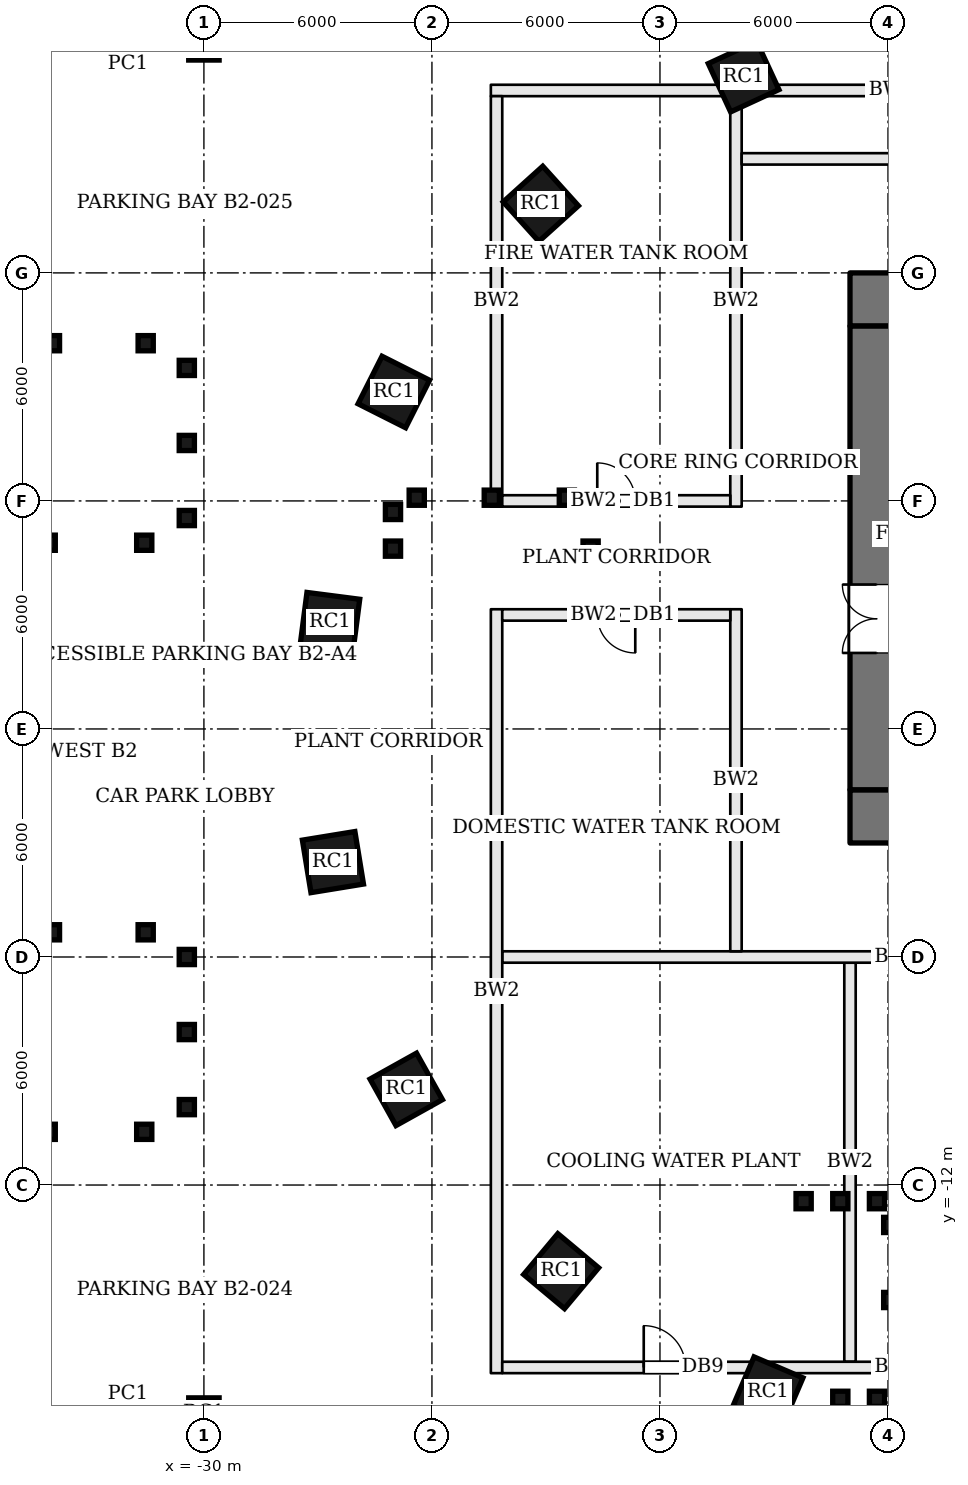
"""IFC4 building model, lengths in metres.
Left out: names, types, materials, properties, quantities, classifications, styles, units other than length and angle.
Written with IfcOpenShell. Run it as: python <this file> out.ifc"""

import sys

from ifc_helpers import new_model, si_unit, direction, frame, frame_2d, origin, origin_2d, place, context, subcontext, project, spatial, rectangle, extrude, element, fill, save


model = new_model("IFC4")
c1 = context("Model", 3, precision=1e-05, world=origin(), true_north=direction((0.0, 1.0)))
c2 = subcontext(c1, "Body", "Model", "MODEL_VIEW")
j1 = project(units=[si_unit("LENGTHUNIT", "METRE"), si_unit("PLANEANGLEUNIT", "RADIAN")], contexts=[c1])
p1 = place(None, origin())
s1 = spatial("IfcSite", under=j1, at=p1, CompositionType="ELEMENT")
p2 = place(p1, origin())
s2 = spatial("IfcBuilding", under=s1, at=p2, CompositionType="ELEMENT")
p3 = place(p2, frame((0.0, 0.0, -10.5)))
s3 = spatial("IfcBuildingStorey", under=s2, at=p3, CompositionType="ELEMENT", Elevation=-10.5)
for number, where, z_axis, x_axis in (
    (1, (-30.0, -18.0, 0.0), (0.0, 0.0, 1.0), (1.0, 0.0, 0.0)),
    (2, (-30.0, 18.0, 0.0), (0.0, 0.0, 1.0), (1.0, 0.0, 0.0)),
):
    element("IfcColumn", number, at=place(p3, frame(where, z_axis=z_axis, x_axis=x_axis)), inside=s3, PredefinedType="COLUMN", context=c2, shape_type="SweptSolid", body=[
        extrude(rectangle(XDim=0.8, YDim=0.8, at=origin_2d()), origin(), (0.0, 0.0, 1.0), 4.5),
    ])
p4 = place(p3, frame((-13.0, 11.3, 0.0), z_axis=(0.0, 0.0, 1.0), x_axis=(1.0, 0.0, 0.0)))
e3 = element("IfcWall", 3, at=p4, inside=s3, PredefinedType="SHEAR", context=c2, shape_type="SweptSolid", body=[
    extrude(rectangle(XDim=26.0, YDim=1.4, at=frame_2d((13.0, 0.0))), origin(), (0.0, 0.0, 1.0), 4.5),
])
p5 = place(p4, frame((9.55, 0.0, 0.0)))
e4 = element("IfcOpeningElement", 4, at=p5, cuts=e3, PredefinedType="OPENING", context=c2, shape_type="SweptSolid", body=[
    extrude(rectangle(XDim=1.2, YDim=2.1, at=frame_2d((0.6, 1.05))), frame((0.0, 0.71, 0.0), z_axis=(0.0, -1.0, 0.0), x_axis=(1.0, 0.0, 0.0)), (0.0, 0.0, 1.0), 1.42),
])
p6 = place(p4, frame((13.075, 0.0, 0.0)))
e5 = element("IfcOpeningElement", 5, at=p6, cuts=e3, PredefinedType="OPENING", context=c2, shape_type="SweptSolid", body=[
    extrude(rectangle(XDim=0.7, YDim=2.1, at=frame_2d((0.35, 1.05))), frame((0.0, 0.71, 0.0), z_axis=(0.0, -1.0, 0.0), x_axis=(1.0, 0.0, 0.0)), (0.0, 0.0, 1.0), 1.42),
])
p7 = place(p4, frame((15.925, 0.0, 0.0)))
e6 = element("IfcOpeningElement", 6, at=p7, cuts=e3, PredefinedType="OPENING", context=c2, shape_type="SweptSolid", body=[
    extrude(rectangle(XDim=0.7, YDim=2.1, at=frame_2d((0.35, 1.05))), frame((0.0, 0.71, 0.0), z_axis=(0.0, -1.0, 0.0), x_axis=(1.0, 0.0, 0.0)), (0.0, 0.0, 1.0), 1.42),
])
p8 = place(p3, frame((-13.0, -2.3, 0.0), z_axis=(0.0, 0.0, 1.0), x_axis=(1.0, 0.0, 0.0)))
e7 = element("IfcWall", 7, at=p8, inside=s3, PredefinedType="SHEAR", context=c2, shape_type="SweptSolid", body=[
    extrude(rectangle(XDim=26.0, YDim=1.4, at=frame_2d((13.0, 0.0))), origin(), (0.0, 0.0, 1.0), 4.5),
])
p9 = place(p8, frame((8.725, 0.0, 0.0)))
e8 = element("IfcOpeningElement", 8, at=p9, cuts=e7, PredefinedType="OPENING", context=c2, shape_type="SweptSolid", body=[
    extrude(rectangle(XDim=1.2, YDim=2.1, at=frame_2d((0.6, 1.05))), frame((0.0, 0.71, 0.0), z_axis=(0.0, -1.0, 0.0), x_axis=(1.0, 0.0, 0.0)), (0.0, 0.0, 1.0), 1.42),
])
p10 = place(p8, frame((12.0, 0.0, 0.0)))
e9 = element("IfcOpeningElement", 9, at=p10, cuts=e7, PredefinedType="OPENING", context=c2, shape_type="SweptSolid", body=[
    extrude(rectangle(XDim=1.2, YDim=2.1, at=frame_2d((0.6, 1.05))), frame((0.0, 0.71, 0.0), z_axis=(0.0, -1.0, 0.0), x_axis=(1.0, 0.0, 0.0)), (0.0, 0.0, 1.0), 1.42),
])
p11 = place(p8, frame((15.675, 0.0, 0.0)))
e10 = element("IfcOpeningElement", 10, at=p11, cuts=e7, PredefinedType="OPENING", context=c2, shape_type="SweptSolid", body=[
    extrude(rectangle(XDim=1.2, YDim=2.1, at=frame_2d((0.6, 1.05))), frame((0.0, 0.71, 0.0), z_axis=(0.0, -1.0, 0.0), x_axis=(1.0, 0.0, 0.0)), (0.0, 0.0, 1.0), 1.42),
])
p12 = place(p3, frame((-12.3, -1.6, 0.0), z_axis=(0.0, 0.0, 1.0), x_axis=(0.0, 1.0, 0.0)))
e11 = element("IfcWall", 11, at=p12, inside=s3, PredefinedType="SHEAR", context=c2, shape_type="SweptSolid", body=[
    extrude(rectangle(XDim=12.2, YDim=1.4, at=frame_2d((6.1, 0.0))), origin(), (0.0, 0.0, 1.0), 4.5),
])
p13 = place(p12, frame((3.6, 0.0, 0.0)))
e12 = element("IfcOpeningElement", 12, at=p13, cuts=e11, PredefinedType="OPENING", context=c2, shape_type="SweptSolid", body=[
    extrude(rectangle(XDim=1.8, YDim=2.1, at=frame_2d((0.9, 1.05))), frame((0.0, 0.71, 0.0), z_axis=(0.0, -1.0, 0.0), x_axis=(1.0, 0.0, 0.0)), (0.0, 0.0, 1.0), 1.42),
])
for number, where, z_axis, x_axis in (
    (13, (-15.799, 17.165, 0.0), (0.0, 0.0, 1.0), (-0.908, -0.419, 0.0)),
    (14, (-21.135, 13.817, 0.0), (0.0, 0.0, 1.0), (-0.743, -0.67, 0.0)),
    (15, (-25.003, 8.866, 0.0), (0.0, 0.0, 1.0), (-0.45, -0.893, 0.0)),
    (16, (-26.684, 2.808, 0.0), (0.0, 0.0, 1.0), (-0.128, -0.992, 0.0)),
    (17, (-26.605, -3.503, 0.0), (0.0, 0.0, 1.0), (0.161, -0.987, 0.0)),
    (18, (-24.676, -9.483, 0.0), (0.0, 0.0, 1.0), (0.487, -0.873, 0.0)),
    (19, (-20.6, -14.266, 0.0), (0.0, 0.0, 1.0), (0.767, -0.641, 0.0)),
    (20, (-15.157, -17.441, 0.0), (0.0, 0.0, 1.0), (0.919, -0.394, 0.0)),
):
    element("IfcColumn", number, at=place(p3, frame(where, z_axis=z_axis, x_axis=x_axis)), inside=s3, PredefinedType="COLUMN", context=c2, shape_type="SweptSolid", body=[
        extrude(rectangle(XDim=1.4, YDim=1.4, at=origin_2d()), origin(), (0.0, 0.0, 1.0), 4.5),
    ])
for number, where, z_axis, x_axis in (
    (21, (-32.0, 17.5, 0.0), (0.0, 0.0, 1.0), (1.0, 0.0, 0.0)),
    (22, (-32.0, -17.5, 0.0), (0.0, 0.0, 1.0), (1.0, 0.0, 0.0)),
):
    element("IfcColumn", number, at=place(p3, frame(where, z_axis=z_axis, x_axis=x_axis)), inside=s3, PredefinedType="COLUMN", context=c2, shape_type="SweptSolid", body=[
        extrude(rectangle(XDim=0.4, YDim=0.4, at=origin_2d()), origin(), (0.0, 0.0, 1.0), 4.5),
    ])
p14 = place(p3, frame((-13.0, -16.65, 0.0), z_axis=(0.0, 0.0, 1.0), x_axis=(0.0, 1.0, 0.0)))
e23 = element("IfcWall", 23, at=p14, inside=s3, PredefinedType="SOLIDWALL", context=c2, shape_type="SweptSolid", body=[
    extrude(rectangle(XDim=10.5, YDim=0.3, at=frame_2d((5.25, 0.0))), origin(), (0.0, 0.0, 1.0), 3.48),
])
p15 = place(p3, frame((-1.35, -6.0, 0.0), z_axis=(0.0, 0.0, 1.0), x_axis=(-1.0, 0.0, 0.0)))
e24 = element("IfcWall", 24, at=p15, inside=s3, PredefinedType="SOLIDWALL", context=c2, shape_type="SweptSolid", body=[
    extrude(rectangle(XDim=20.8, YDim=0.3, at=frame_2d((10.4, 0.0))), origin(), (0.0, 0.0, 1.0), 3.48),
])
p16 = place(p3, frame((-22.3, 3.15, 0.0), z_axis=(0.0, 0.0, 1.0), x_axis=(0.0, -1.0, 0.0)))
e25 = element("IfcWall", 25, at=p16, inside=s3, PredefinedType="SOLIDWALL", context=c2, shape_type="SweptSolid", body=[
    extrude(rectangle(XDim=20.1, YDim=0.3, at=frame_2d((10.05, 0.0))), origin(), (0.0, 0.0, 1.0), 3.48),
])
p17 = place(p3, frame((-22.15, -16.8, 0.0), z_axis=(0.0, 0.0, 1.0), x_axis=(1.0, 0.0, 0.0)))
e26 = element("IfcWall", 26, at=p17, inside=s3, PredefinedType="SOLIDWALL", context=c2, shape_type="SweptSolid", body=[
    extrude(rectangle(XDim=20.8, YDim=0.3, at=frame_2d((10.4, 0.0))), origin(), (0.0, 0.0, 1.0), 3.48),
])
p18 = place(p17, frame((3.723, 0.0, 0.0)))
e27 = element("IfcOpeningElement", 27, at=p18, cuts=e26, PredefinedType="OPENING", context=c2, shape_type="SweptSolid", body=[
    extrude(rectangle(XDim=1.1, YDim=2.4, at=frame_2d((0.55, 1.2))), frame((0.0, 0.16, 0.0), z_axis=(0.0, -1.0, 0.0), x_axis=(1.0, 0.0, 0.0)), (0.0, 0.0, 1.0), 0.32),
])
p19 = place(p3, frame((-16.0, -5.85, 0.0), z_axis=(0.0, 0.0, 1.0), x_axis=(0.0, 1.0, 0.0)))
e28 = element("IfcWall", 28, at=p19, inside=s3, PredefinedType="SOLIDWALL", context=c2, shape_type="SweptSolid", body=[
    extrude(rectangle(XDim=9.0, YDim=0.3, at=frame_2d((4.5, 0.0))), origin(), (0.0, 0.0, 1.0), 3.48),
])
p20 = place(p3, frame((-16.15, 3.0, 0.0), z_axis=(0.0, 0.0, 1.0), x_axis=(-1.0, 0.0, 0.0)))
e29 = element("IfcWall", 29, at=p20, inside=s3, PredefinedType="SOLIDWALL", context=c2, shape_type="SweptSolid", body=[
    extrude(rectangle(XDim=6.0, YDim=0.3, at=frame_2d((3.0, 0.0))), origin(), (0.0, 0.0, 1.0), 3.48),
])
p21 = place(p20, frame((2.5, 0.0, 0.0)))
e30 = element("IfcOpeningElement", 30, at=p21, cuts=e29, PredefinedType="OPENING", context=c2, shape_type="SweptSolid", body=[
    extrude(rectangle(XDim=1.0, YDim=2.1, at=frame_2d((0.5, 1.05))), frame((0.0, 0.16, 0.0), z_axis=(0.0, -1.0, 0.0), x_axis=(1.0, 0.0, 0.0)), (0.0, 0.0, 1.0), 0.32),
])
p22 = place(p3, frame((-16.0, 5.85, 0.0), z_axis=(0.0, 0.0, 1.0), x_axis=(0.0, 1.0, 0.0)))
e31 = element("IfcWall", 31, at=p22, inside=s3, PredefinedType="SOLIDWALL", context=c2, shape_type="SweptSolid", body=[
    extrude(rectangle(XDim=10.8, YDim=0.3, at=frame_2d((5.4, 0.0))), origin(), (0.0, 0.0, 1.0), 3.48),
])
p23 = place(p3, frame((-1.35, 16.8, 0.0), z_axis=(0.0, 0.0, 1.0), x_axis=(-1.0, 0.0, 0.0)))
e32 = element("IfcWall", 32, at=p23, inside=s3, PredefinedType="SOLIDWALL", context=c2, shape_type="SweptSolid", body=[
    extrude(rectangle(XDim=21.1, YDim=0.3, at=frame_2d((10.55, 0.0))), origin(), (0.0, 0.0, 1.0), 3.48),
])
p24 = place(p3, frame((-22.3, 16.65, 0.0), z_axis=(0.0, 0.0, 1.0), x_axis=(0.0, -1.0, 0.0)))
e33 = element("IfcWall", 33, at=p24, inside=s3, PredefinedType="SOLIDWALL", context=c2, shape_type="SweptSolid", body=[
    extrude(rectangle(XDim=10.8, YDim=0.3, at=frame_2d((5.4, 0.0))), origin(), (0.0, 0.0, 1.0), 3.48),
])
p25 = place(p3, frame((-22.15, 6.0, 0.0), z_axis=(0.0, 0.0, 1.0), x_axis=(1.0, 0.0, 0.0)))
e34 = element("IfcWall", 34, at=p25, inside=s3, PredefinedType="SOLIDWALL", context=c2, shape_type="SweptSolid", body=[
    extrude(rectangle(XDim=6.0, YDim=0.3, at=frame_2d((3.0, 0.0))), origin(), (0.0, 0.0, 1.0), 3.48),
])
p26 = place(p25, frame((2.5, 0.0, 0.0)))
e35 = element("IfcOpeningElement", 35, at=p26, cuts=e34, PredefinedType="OPENING", context=c2, shape_type="SweptSolid", body=[
    extrude(rectangle(XDim=1.0, YDim=2.1, at=frame_2d((0.5, 1.05))), frame((0.0, 0.16, 0.0), z_axis=(0.0, -1.0, 0.0), x_axis=(1.0, 0.0, 0.0)), (0.0, 0.0, 1.0), 0.32),
])
p27 = place(p3, frame((-15.85, 15.0, 0.0), z_axis=(0.0, 0.0, 1.0), x_axis=(1.0, 0.0, 0.0)))
e36 = element("IfcWall", 36, at=p27, inside=s3, PredefinedType="SOLIDWALL", context=c2, shape_type="SweptSolid", body=[
    extrude(rectangle(XDim=14.2, YDim=0.3, at=frame_2d((7.1, 0.0))), origin(), (0.0, 0.0, 1.0), 3.48),
])
for number, where, z_axis, x_axis in (
    (37, (-20.45, 6.085, 0.0), (0.0, 0.0, 1.0), (1.0, 0.0, 0.0)),
    (38, (-24.4, 6.085, 0.0), (0.0, 0.0, 1.0), (1.0, 0.0, 0.0)),
    (39, (-22.425, 6.085, 0.0), (0.0, 0.0, 1.0), (1.0, 0.0, 0.0)),
    (40, (-25.025, 5.71, 0.0), (0.0, 0.0, 1.0), (1.0, 0.0, 0.0)),
    (41, (-25.025, 4.745, 0.0), (0.0, 0.0, 1.0), (1.0, 0.0, 0.0)),
    (42, (-19.825, 4.745, 0.0), (0.0, 0.0, 1.0), (1.0, 0.0, 0.0)),
    (43, (-11.915, -13.05, 0.0), (0.0, 0.0, 1.0), (1.0, 0.0, 0.0)),
    (44, (-11.915, -15.025, 0.0), (0.0, 0.0, 1.0), (1.0, 0.0, 0.0)),
    (45, (-12.29, -17.625, 0.0), (0.0, 0.0, 1.0), (1.0, 0.0, 0.0)),
    (46, (-13.255, -17.625, 0.0), (0.0, 0.0, 1.0), (1.0, 0.0, 0.0)),
    (47, (-14.22, -12.425, 0.0), (0.0, 0.0, 1.0), (1.0, 0.0, 0.0)),
    (48, (-12.29, -12.425, 0.0), (0.0, 0.0, 1.0), (1.0, 0.0, 0.0)),
    (49, (-13.255, -12.425, 0.0), (0.0, 0.0, 1.0), (1.0, 0.0, 0.0)),
    (50, (-31.57, 4.9, 0.0), (0.0, 0.0, 1.0), (1.0, 0.0, 0.0)),
    (51, (-34.11, 4.9, 0.0), (0.0, 0.0, 1.0), (1.0, 0.0, 0.0)),
    (52, (-33.998, 10.15, 0.0), (0.0, 0.0, 1.0), (1.0, 0.0, 0.0)),
    (53, (-31.532, 10.15, 0.0), (0.0, 0.0, 1.0), (1.0, 0.0, 0.0)),
    (54, (-30.45, 9.5, 0.0), (0.0, 0.0, 1.0), (1.0, 0.0, 0.0)),
    (55, (-30.45, 5.55, 0.0), (0.0, 0.0, 1.0), (1.0, 0.0, 0.0)),
    (56, (-30.45, 7.525, 0.0), (0.0, 0.0, 1.0), (1.0, 0.0, 0.0)),
    (57, (-31.57, -10.6, 0.0), (0.0, 0.0, 1.0), (1.0, 0.0, 0.0)),
    (58, (-34.11, -10.6, 0.0), (0.0, 0.0, 1.0), (1.0, 0.0, 0.0)),
    (59, (-33.998, -5.35, 0.0), (0.0, 0.0, 1.0), (1.0, 0.0, 0.0)),
    (60, (-31.532, -5.35, 0.0), (0.0, 0.0, 1.0), (1.0, 0.0, 0.0)),
    (61, (-30.45, -6.0, 0.0), (0.0, 0.0, 1.0), (1.0, 0.0, 0.0)),
    (62, (-30.45, -9.95, 0.0), (0.0, 0.0, 1.0), (1.0, 0.0, 0.0)),
    (63, (-30.45, -7.975, 0.0), (0.0, 0.0, 1.0), (1.0, 0.0, 0.0)),
):
    element("IfcColumn", number, at=place(p3, frame(where, z_axis=z_axis, x_axis=x_axis)), inside=s3, PredefinedType="COLUMN", context=c2, shape_type="SweptSolid", body=[
        extrude(rectangle(XDim=0.4, YDim=0.4, at=origin_2d()), origin(), (0.0, 0.0, 1.0), 4.5),
    ])
p28 = place(p13, origin())
e64 = element("IfcDoor", 64, at=p28, inside=s3, OperationType="DOUBLE_DOOR_SINGLE_SWING", PredefinedType="DOOR", context=c2, shape_type="SweptSolid", body=[
    extrude(rectangle(XDim=1.8, YDim=2.1, at=frame_2d((0.9, 1.05))), frame((0.0, 0.025, 0.0), z_axis=(0.0, -1.0, 0.0), x_axis=(1.0, 0.0, 0.0)), (0.0, 0.0, 1.0), 0.05),
])
fill(e12, e64)
p29 = place(p18, origin())
e65 = element("IfcDoor", 65, at=p29, inside=s3, OperationType="SINGLE_SWING_LEFT", PredefinedType="DOOR", context=c2, shape_type="SweptSolid", body=[
    extrude(rectangle(XDim=1.1, YDim=2.4, at=frame_2d((0.55, 1.2))), frame((0.0, 0.025, 0.0), z_axis=(0.0, -1.0, 0.0), x_axis=(1.0, 0.0, 0.0)), (0.0, 0.0, 1.0), 0.05),
])
fill(e27, e65)
p30 = place(p21, origin())
e66 = element("IfcDoor", 66, at=p30, inside=s3, OperationType="SINGLE_SWING_LEFT", PredefinedType="DOOR", context=c2, shape_type="SweptSolid", body=[
    extrude(rectangle(XDim=1.0, YDim=2.1, at=frame_2d((0.5, 1.05))), frame((0.0, 0.025, 0.0), z_axis=(0.0, -1.0, 0.0), x_axis=(1.0, 0.0, 0.0)), (0.0, 0.0, 1.0), 0.05),
])
fill(e30, e66)
p31 = place(p26, origin())
e67 = element("IfcDoor", 67, at=p31, inside=s3, OperationType="SINGLE_SWING_LEFT", PredefinedType="DOOR", context=c2, shape_type="SweptSolid", body=[
    extrude(rectangle(XDim=1.0, YDim=2.1, at=frame_2d((0.5, 1.05))), frame((0.0, 0.025, 0.0), z_axis=(0.0, -1.0, 0.0), x_axis=(1.0, 0.0, 0.0)), (0.0, 0.0, 1.0), 0.05),
])
fill(e35, e67)
save(model, sys.argv[1])
